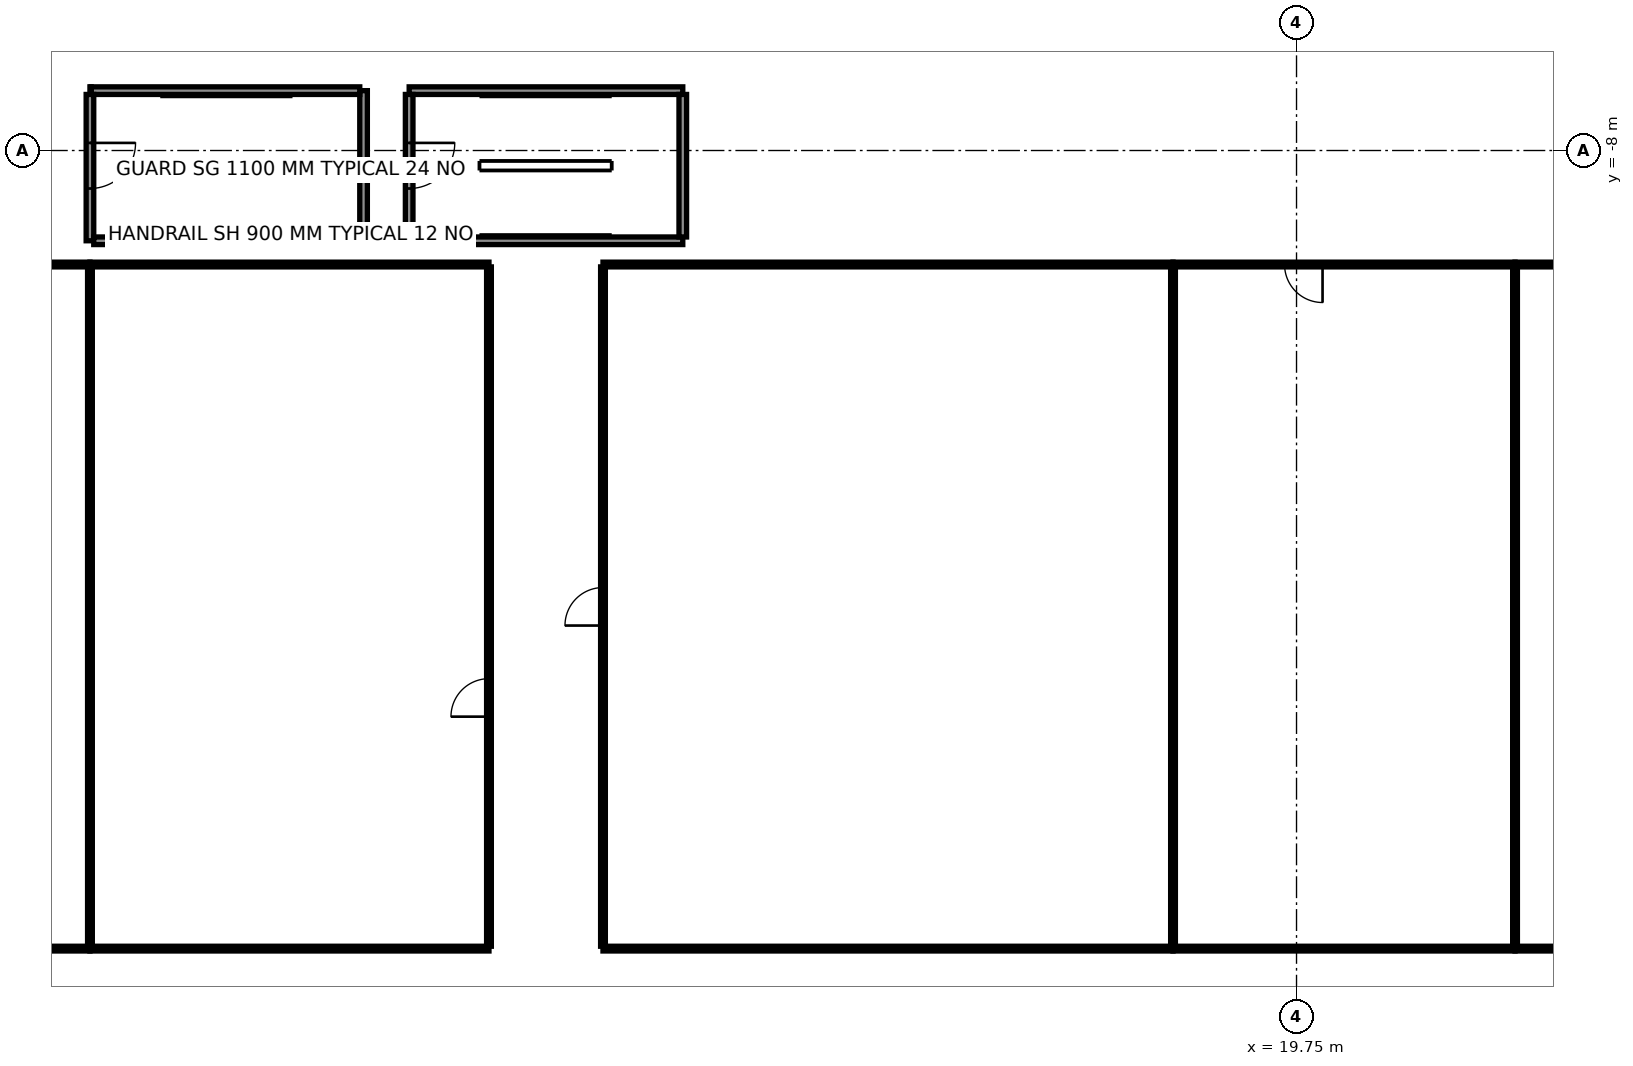
"""IFC4 building model, lengths in metres.
Left out: names, types, materials, properties, quantities, classifications, styles, units other than length and angle.
Written with IfcOpenShell. Run it as: python <this file> out.ifc"""

import sys

from ifc_helpers import new_model, si_unit, direction, frame, frame_2d, origin, origin_2d, place, context, subcontext, project, spatial, rectangle, hollow_rectangle, circle, extrude, element, fill, save


model = new_model("IFC4")
c1 = context("Model", 3, precision=1e-05, world=origin(), true_north=direction((0.0, 1.0)))
c2 = subcontext(c1, "Body", "Model", "MODEL_VIEW")
j1 = project(units=[si_unit("LENGTHUNIT", "METRE"), si_unit("PLANEANGLEUNIT", "RADIAN")], contexts=[c1])
p1 = place(None, origin())
s1 = spatial("IfcSite", under=j1, at=p1, CompositionType="ELEMENT")
p2 = place(p1, origin())
s2 = spatial("IfcBuilding", under=s1, at=p2, CompositionType="ELEMENT")
p3 = place(p2, frame((0.0, 0.0, 7.0)))
s3 = spatial("IfcBuildingStorey", under=s2, at=p3, CompositionType="ELEMENT", Elevation=7.0)
for number, where, z_axis, x_axis in (
    (1, (-4.2, -26.0, 0.0), (0.0, 0.0, 1.0), (1.0, 0.0, 0.0)),
    (2, (-4.2, -12.6, 0.0), (0.0, 0.0, 1.0), (1.0, 0.0, 0.0)),
    (3, (4.2, -26.0, 0.0), (0.0, 0.0, 1.0), (1.0, 0.0, 0.0)),
    (4, (4.2, -12.6, 0.0), (0.0, 0.0, 1.0), (1.0, 0.0, 0.0)),
    (5, (12.6, -26.0, 0.0), (0.0, 0.0, 1.0), (1.0, 0.0, 0.0)),
):
    element("IfcColumn", number, at=place(p3, frame(where, z_axis=z_axis, x_axis=x_axis)), inside=s3, PredefinedType="COLUMN", context=c2, shape_type="SweptSolid", body=[
        extrude(circle(Radius=0.6, at=origin_2d()), origin(), (0.0, 0.0, 1.0), 5.0),
    ])
for number, where, z_axis, x_axis in (
    (6, (-11.317, -11.797, 0.0), (0.0, 0.0, 1.0), (0.866, -0.5, 0.0)),
    (7, (8.96, -6.107, 0.0), (0.0, 0.0, 1.0), (-0.966, -0.259, 0.0)),
    (8, (14.594, -17.156, 0.0), (0.0, 0.0, 1.0), (-0.707, -0.707, 0.0)),
    (9, (25.643, -22.79, 0.0), (0.0, 0.0, 1.0), (-0.259, -0.966, 0.0)),
):
    element("IfcColumn", number, at=place(p3, frame(where, z_axis=z_axis, x_axis=x_axis)), inside=s3, PredefinedType="COLUMN", context=c2, shape_type="SweptSolid", body=[
        extrude(hollow_rectangle(XDim=1.5, YDim=1.5, WallThickness=0.07, at=origin_2d()), origin(), (0.0, 0.0, 1.0), 5.0),
    ])
p4 = place(p3, frame((19.3, -8.0, 0.0), z_axis=(0.0, 0.0, 1.0), x_axis=(1.0, 0.0, 0.0)))
e10 = element("IfcWall", 10, at=p4, inside=s3, PredefinedType="SHEAR", context=c2, shape_type="SweptSolid", body=[
    extrude(rectangle(XDim=24.9, YDim=0.9, at=frame_2d((12.45, 0.0))), origin(), (0.0, 0.0, 1.0), 5.0),
])
p5 = place(p4, frame((13.3, 0.0, 0.0)))
e11 = element("IfcOpeningElement", 11, at=p5, cuts=e10, PredefinedType="OPENING", context=c2, shape_type="SweptSolid", body=[
    extrude(rectangle(XDim=1.1, YDim=2.1, at=frame_2d((0.55, 1.05))), frame((0.0, 0.46, 0.0), z_axis=(0.0, -1.0, 0.0), x_axis=(1.0, 0.0, 0.0)), (0.0, 0.0, 1.0), 0.92),
])
p6 = place(p4, frame((1.775, 0.0, 0.0)))
e12 = element("IfcOpeningElement", 12, at=p6, cuts=e10, PredefinedType="OPENING", context=c2, shape_type="SweptSolid", body=[
    extrude(rectangle(XDim=0.9, YDim=2.1, at=frame_2d((0.45, 1.05))), frame((0.0, 0.46, 0.0), z_axis=(0.0, -1.0, 0.0), x_axis=(1.0, 0.0, 0.0)), (0.0, 0.0, 1.0), 0.92),
])
p7 = place(p4, frame((4.425, 0.0, 0.0)))
e13 = element("IfcOpeningElement", 13, at=p7, cuts=e10, PredefinedType="OPENING", context=c2, shape_type="SweptSolid", body=[
    extrude(rectangle(XDim=0.9, YDim=2.1, at=frame_2d((0.45, 1.05))), frame((0.0, 0.46, 0.0), z_axis=(0.0, -1.0, 0.0), x_axis=(1.0, 0.0, 0.0)), (0.0, 0.0, 1.0), 0.92),
])
p8 = place(p4, frame((6.675, 0.0, 0.0)))
e14 = element("IfcOpeningElement", 14, at=p8, cuts=e10, PredefinedType="OPENING", context=c2, shape_type="SweptSolid", body=[
    extrude(rectangle(XDim=1.0, YDim=2.1, at=frame_2d((0.5, 1.05))), frame((0.0, 0.46, 0.0), z_axis=(0.0, -1.0, 0.0), x_axis=(1.0, 0.0, 0.0)), (0.0, 0.0, 1.0), 0.92),
])
p9 = place(p3, frame((19.75, -8.0, 0.0), z_axis=(0.0, 0.0, 1.0), x_axis=(0.0, 1.0, 0.0)))
e15 = element("IfcWall", 15, at=p9, inside=s3, PredefinedType="SHEAR", context=c2, shape_type="SweptSolid", body=[
    extrude(rectangle(XDim=16.0, YDim=0.9, at=frame_2d((8.0, 0.0))), origin(), (0.0, 0.0, 1.0), 5.0),
])
p10 = place(p9, frame((7.1, 0.0, 0.0)))
e16 = element("IfcOpeningElement", 16, at=p10, cuts=e15, PredefinedType="OPENING", context=c2, shape_type="SweptSolid", body=[
    extrude(rectangle(XDim=1.8, YDim=2.1, at=frame_2d((0.9, 1.05))), frame((0.0, 0.46, 0.0), z_axis=(0.0, -1.0, 0.0), x_axis=(1.0, 0.0, 0.0)), (0.0, 0.0, 1.0), 0.92),
])
for number, where, z_axis, x_axis in (
    (17, (22.95, -4.4, 0.0), (0.0, 0.0, 1.0), (0.0, -1.0, 0.0)),
    (18, (25.4, -4.4, 0.0), (0.0, 0.0, 1.0), (0.0, -1.0, 0.0)),
):
    element("IfcWall", number, at=place(p3, frame(where, z_axis=z_axis, x_axis=x_axis)), inside=s3, PredefinedType="PARTITIONING", context=c2, shape_type="SweptSolid", body=[
        extrude(rectangle(XDim=3.15, YDim=0.2, at=frame_2d((1.575, 0.0))), origin(), (0.0, 0.0, 1.0), 5.0),
    ])
p11 = place(p3, frame((-4.8, -10.375, 0.0), z_axis=(0.0, 0.0, 1.0), x_axis=(0.0, 1.0, 0.0)))
e19 = element("IfcWall", 19, at=p11, inside=s3, PredefinedType="SOLIDWALL", context=c2, shape_type="SweptSolid", body=[
    extrude(rectangle(XDim=3.95, YDim=0.2, at=frame_2d((1.975, 0.0))), origin(), (0.0, 0.0, 1.0), 4.7),
])
p12 = place(p3, frame((-4.9, -6.425, 0.0), z_axis=(0.0, 0.0, 1.0), x_axis=(-1.0, 0.0, 0.0)))
e20 = element("IfcWall", 20, at=p12, inside=s3, PredefinedType="SOLIDWALL", context=c2, shape_type="SweptSolid", body=[
    extrude(rectangle(XDim=7.068, YDim=0.2, at=frame_2d((3.534, 0.0))), origin(), (0.0, 0.0, 1.0), 4.7),
])
p13 = place(p3, frame((-11.968, -6.425, 0.0), z_axis=(0.0, 0.0, 1.0), x_axis=(-1.0, 0.0, 0.0)))
e21 = element("IfcWall", 21, at=p13, inside=s3, PredefinedType="SOLIDWALL", context=c2, shape_type="SweptSolid", body=[
    extrude(rectangle(XDim=0.032, YDim=0.2, at=frame_2d((0.016, 0.0))), origin(), (0.0, 0.0, 1.0), 3.996),
])
p14 = place(p3, frame((-12.0, -6.525, 0.0), z_axis=(0.0, 0.0, 1.0), x_axis=(0.0, -1.0, 0.0)))
e22 = element("IfcWall", 22, at=p14, inside=s3, PredefinedType="SOLIDWALL", context=c2, shape_type="SweptSolid", body=[
    extrude(rectangle(XDim=3.85, YDim=0.2, at=frame_2d((1.925, 0.0))), origin(), (0.0, 0.0, 1.0), 4.7),
])
p15 = place(p14, frame((1.275, 0.0, 0.0)))
e23 = element("IfcOpeningElement", 23, at=p15, cuts=e22, PredefinedType="OPENING", context=c2, shape_type="SweptSolid", body=[
    extrude(rectangle(XDim=1.2, YDim=2.1, at=frame_2d((0.6, 1.05))), frame((0.0, 0.11, 0.0), z_axis=(0.0, -1.0, 0.0), x_axis=(1.0, 0.0, 0.0)), (0.0, 0.0, 1.0), 0.22),
])
p16 = place(p3, frame((-11.9, -10.375, 0.0), z_axis=(0.0, 0.0, 1.0), x_axis=(1.0, 0.0, 0.0)))
e24 = element("IfcWall", 24, at=p16, inside=s3, PredefinedType="SOLIDWALL", context=c2, shape_type="SweptSolid", body=[
    extrude(rectangle(XDim=7.0, YDim=0.2, at=frame_2d((3.5, 0.0))), origin(), (0.0, 0.0, 1.0), 4.7),
])
p17 = place(p3, frame((3.6, -6.425, 0.0), z_axis=(0.0, 0.0, 1.0), x_axis=(-1.0, 0.0, 0.0)))
e25 = element("IfcWall", 25, at=p17, inside=s3, PredefinedType="SOLIDWALL", context=c2, shape_type="SweptSolid", body=[
    extrude(rectangle(XDim=7.2, YDim=0.2, at=frame_2d((3.6, 0.0))), origin(), (0.0, 0.0, 1.0), 4.7),
])
p18 = place(p3, frame((-3.6, -6.525, 0.0), z_axis=(0.0, 0.0, 1.0), x_axis=(0.0, -1.0, 0.0)))
e26 = element("IfcWall", 26, at=p18, inside=s3, PredefinedType="SOLIDWALL", context=c2, shape_type="SweptSolid", body=[
    extrude(rectangle(XDim=3.85, YDim=0.2, at=frame_2d((1.925, 0.0))), origin(), (0.0, 0.0, 1.0), 4.7),
])
p19 = place(p18, frame((1.275, 0.0, 0.0)))
e27 = element("IfcOpeningElement", 27, at=p19, cuts=e26, PredefinedType="OPENING", context=c2, shape_type="SweptSolid", body=[
    extrude(rectangle(XDim=1.2, YDim=2.1, at=frame_2d((0.6, 1.05))), frame((0.0, 0.11, 0.0), z_axis=(0.0, -1.0, 0.0), x_axis=(1.0, 0.0, 0.0)), (0.0, 0.0, 1.0), 0.22),
])
p20 = place(p3, frame((-3.5, -10.375, 0.0), z_axis=(0.0, 0.0, 1.0), x_axis=(1.0, 0.0, 0.0)))
e28 = element("IfcWall", 28, at=p20, inside=s3, PredefinedType="SOLIDWALL", context=c2, shape_type="SweptSolid", body=[
    extrude(rectangle(XDim=7.1, YDim=0.2, at=frame_2d((3.55, 0.0))), origin(), (0.0, 0.0, 1.0), 4.7),
])
p21 = place(p3, frame((3.6, -10.275, 0.0), z_axis=(0.0, 0.0, 1.0), x_axis=(0.0, 1.0, 0.0)))
e29 = element("IfcWall", 29, at=p21, inside=s3, PredefinedType="SOLIDWALL", context=c2, shape_type="SweptSolid", body=[
    extrude(rectangle(XDim=3.75, YDim=0.2, at=frame_2d((1.875, 0.0))), origin(), (0.0, 0.0, 1.0), 4.7),
])
p22 = place(p3, frame((-27.0, -11.0, 0.0), z_axis=(0.0, 0.0, 1.0), x_axis=(1.0, 0.0, 0.0)))
e30 = element("IfcWall", 30, at=p22, inside=s3, PredefinedType="PARTITIONING", context=c2, shape_type="SweptSolid", body=[
    extrude(rectangle(XDim=15.0, YDim=0.125, at=frame_2d((7.5, 0.0))), origin(), (0.0, 0.0, 1.0), 3.996),
])
p23 = place(p22, frame((5.035, 0.0, 0.0)))
e31 = element("IfcOpeningElement", 31, at=p23, cuts=e30, PredefinedType="OPENING", context=c2, shape_type="SweptSolid", body=[
    extrude(rectangle(XDim=1.0, YDim=2.1, at=frame_2d((0.5, 1.05))), frame((0.0, 0.073, 0.0), z_axis=(0.0, -1.0, 0.0), x_axis=(1.0, 0.0, 0.0)), (0.0, 0.0, 1.0), 0.145),
])
p24 = place(p3, frame((-12.0, -11.0, 0.0), z_axis=(0.0, 0.0, 1.0), x_axis=(1.0, 0.0, 0.0)))
e32 = element("IfcWall", 32, at=p24, inside=s3, PredefinedType="PARTITIONING", context=c2, shape_type="SweptSolid", body=[
    extrude(rectangle(XDim=10.5, YDim=0.125, at=frame_2d((5.25, 0.0))), origin(), (0.0, 0.0, 1.0), 4.7),
])
p25 = place(p3, frame((1.5, -11.0, 0.0), z_axis=(0.0, 0.0, 1.0), x_axis=(1.0, 0.0, 0.0)))
e33 = element("IfcWall", 33, at=p25, inside=s3, PredefinedType="PARTITIONING", context=c2, shape_type="SweptSolid", body=[
    extrude(rectangle(XDim=15.0, YDim=0.125, at=frame_2d((7.5, 0.0))), origin(), (0.0, 0.0, 1.0), 3.762),
])
p26 = place(p3, frame((16.5, -11.0, 0.0), z_axis=(0.0, 0.0, 1.0), x_axis=(1.0, 0.0, 0.0)))
e34 = element("IfcWall", 34, at=p26, inside=s3, PredefinedType="PARTITIONING", context=c2, shape_type="SweptSolid", body=[
    extrude(rectangle(XDim=9.0, YDim=0.125, at=frame_2d((4.5, 0.0))), origin(), (0.0, 0.0, 1.0), 3.996),
])
p27 = place(p26, frame((2.935, 0.0, 0.0)))
e35 = element("IfcOpeningElement", 35, at=p27, cuts=e34, PredefinedType="OPENING", context=c2, shape_type="SweptSolid", body=[
    extrude(rectangle(XDim=1.0, YDim=2.1, at=frame_2d((0.5, 1.05))), frame((0.0, 0.073, 0.0), z_axis=(0.0, -1.0, 0.0), x_axis=(1.0, 0.0, 0.0)), (0.0, 0.0, 1.0), 0.145),
])
p28 = place(p3, frame((25.5, -11.0, 0.0), z_axis=(0.0, 0.0, 1.0), x_axis=(1.0, 0.0, 0.0)))
e36 = element("IfcWall", 36, at=p28, inside=s3, PredefinedType="PARTITIONING", context=c2, shape_type="SweptSolid", body=[
    extrude(rectangle(XDim=12.0, YDim=0.125, at=frame_2d((6.0, 0.0))), origin(), (0.0, 0.0, 1.0), 3.918),
])
p29 = place(p28, frame((7.015, 0.0, 0.0)))
e37 = element("IfcOpeningElement", 37, at=p29, cuts=e36, PredefinedType="OPENING", context=c2, shape_type="SweptSolid", body=[
    extrude(rectangle(XDim=1.0, YDim=2.1, at=frame_2d((0.5, 1.05))), frame((0.0, 0.073, 0.0), z_axis=(0.0, -1.0, 0.0), x_axis=(1.0, 0.0, 0.0)), (0.0, 0.0, 1.0), 0.145),
])
p30 = place(p3, frame((-12.0, -29.0, 0.0), z_axis=(0.0, 0.0, 1.0), x_axis=(-1.0, 0.0, 0.0)))
e38 = element("IfcWall", 38, at=p30, inside=s3, PredefinedType="PARTITIONING", context=c2, shape_type="SweptSolid", body=[
    extrude(rectangle(XDim=15.0, YDim=0.125, at=frame_2d((7.5, 0.0))), origin(), (0.0, 0.0, 1.0), 3.762),
])
p31 = place(p3, frame((-1.5, -29.0, 0.0), z_axis=(0.0, 0.0, 1.0), x_axis=(-1.0, 0.0, 0.0)))
e39 = element("IfcWall", 39, at=p31, inside=s3, PredefinedType="PARTITIONING", context=c2, shape_type="SweptSolid", body=[
    extrude(rectangle(XDim=10.5, YDim=0.125, at=frame_2d((5.25, 0.0))), origin(), (0.0, 0.0, 1.0), 3.762),
])
p32 = place(p3, frame((16.5, -29.0, 0.0), z_axis=(0.0, 0.0, 1.0), x_axis=(-1.0, 0.0, 0.0)))
e40 = element("IfcWall", 40, at=p32, inside=s3, PredefinedType="PARTITIONING", context=c2, shape_type="SweptSolid", body=[
    extrude(rectangle(XDim=15.0, YDim=0.125, at=frame_2d((7.5, 0.0))), origin(), (0.0, 0.0, 1.0), 3.762),
])
p33 = place(p3, frame((25.5, -29.0, 0.0), z_axis=(0.0, 0.0, 1.0), x_axis=(-1.0, 0.0, 0.0)))
e41 = element("IfcWall", 41, at=p33, inside=s3, PredefinedType="PARTITIONING", context=c2, shape_type="SweptSolid", body=[
    extrude(rectangle(XDim=9.0, YDim=0.125, at=frame_2d((4.5, 0.0))), origin(), (0.0, 0.0, 1.0), 3.762),
])
p34 = place(p3, frame((37.5, -29.0, 0.0), z_axis=(0.0, 0.0, 1.0), x_axis=(-1.0, 0.0, 0.0)))
e42 = element("IfcWall", 42, at=p34, inside=s3, PredefinedType="PARTITIONING", context=c2, shape_type="SweptSolid", body=[
    extrude(rectangle(XDim=12.0, YDim=0.125, at=frame_2d((6.0, 0.0))), origin(), (0.0, 0.0, 1.0), 3.762),
])
p35 = place(p3, frame((-1.5, -11.062, 0.0), z_axis=(0.0, 0.0, 1.0), x_axis=(0.0, -1.0, 0.0)))
e43 = element("IfcWall", 43, at=p35, inside=s3, PredefinedType="PARTITIONING", context=c2, shape_type="SweptSolid", body=[
    extrude(rectangle(XDim=17.875, YDim=0.125, at=frame_2d((8.938, 0.0))), origin(), (0.0, 0.0, 1.0), 3.48),
])
p36 = place(p35, frame((10.834, 0.0, 0.0)))
e44 = element("IfcOpeningElement", 44, at=p36, cuts=e43, PredefinedType="OPENING", context=c2, shape_type="SweptSolid", body=[
    extrude(rectangle(XDim=1.0, YDim=2.1, at=frame_2d((0.5, 1.05))), frame((0.0, 0.073, 0.0), z_axis=(0.0, -1.0, 0.0), x_axis=(1.0, 0.0, 0.0)), (0.0, 0.0, 1.0), 0.145),
])
p37 = place(p3, frame((1.5, -28.938, 0.0), z_axis=(0.0, 0.0, 1.0), x_axis=(0.0, 1.0, 0.0)))
e45 = element("IfcWall", 45, at=p37, inside=s3, PredefinedType="PARTITIONING", context=c2, shape_type="SweptSolid", body=[
    extrude(rectangle(XDim=17.875, YDim=0.125, at=frame_2d((8.938, 0.0))), origin(), (0.0, 0.0, 1.0), 3.48),
])
p38 = place(p37, frame((8.438, 0.0, 0.0)))
e46 = element("IfcOpeningElement", 46, at=p38, cuts=e45, PredefinedType="OPENING", context=c2, shape_type="SweptSolid", body=[
    extrude(rectangle(XDim=1.0, YDim=2.1, at=frame_2d((0.5, 1.05))), frame((0.0, 0.073, 0.0), z_axis=(0.0, -1.0, 0.0), x_axis=(1.0, 0.0, 0.0)), (0.0, 0.0, 1.0), 0.145),
])
p39 = place(p3, frame((-12.0, -28.938, 0.0), z_axis=(0.0, 0.0, 1.0), x_axis=(0.0, 1.0, 0.0)))
e47 = element("IfcWall", 47, at=p39, inside=s3, PredefinedType="PARTITIONING", context=c2, shape_type="SweptSolid", body=[
    extrude(rectangle(XDim=17.875, YDim=0.125, at=frame_2d((8.938, 0.0))), origin(), (0.0, 0.0, 1.0), 3.48),
])
for number, where, z_axis, x_axis in (
    (48, (16.5, -28.938, 0.0), (0.0, 0.0, 1.0), (0.0, 1.0, 0.0)),
    (49, (25.5, -28.938, 0.0), (0.0, 0.0, 1.0), (0.0, 1.0, 0.0)),
):
    element("IfcWall", number, at=place(p3, frame(where, z_axis=z_axis, x_axis=x_axis)), inside=s3, PredefinedType="PARTITIONING", context=c2, shape_type="SweptSolid", body=[
        extrude(rectangle(XDim=17.875, YDim=0.125, at=frame_2d((8.938, 0.0))), origin(), (0.0, 0.0, 1.0), 3.996),
    ])
p40 = place(p6, origin())
e50 = element("IfcDoor", 50, at=p40, inside=s3, OperationType="SINGLE_SWING_RIGHT", PredefinedType="DOOR", context=c2, shape_type="SweptSolid", body=[
    extrude(rectangle(XDim=0.9, YDim=2.1, at=frame_2d((0.45, 1.05))), frame((0.0, 0.45, 0.0), z_axis=(0.0, -1.0, 0.0), x_axis=(1.0, 0.0, 0.0)), (0.0, 0.0, 1.0), 0.05),
])
fill(e12, e50)
p41 = place(p7, origin())
e51 = element("IfcDoor", 51, at=p41, inside=s3, OperationType="SINGLE_SWING_RIGHT", PredefinedType="DOOR", context=c2, shape_type="SweptSolid", body=[
    extrude(rectangle(XDim=0.9, YDim=2.1, at=frame_2d((0.45, 1.05))), frame((0.0, 0.45, 0.0), z_axis=(0.0, -1.0, 0.0), x_axis=(1.0, 0.0, 0.0)), (0.0, 0.0, 1.0), 0.05),
])
fill(e13, e51)
p42 = place(p8, origin())
e52 = element("IfcDoor", 52, at=p42, inside=s3, OperationType="SINGLE_SWING_LEFT", PredefinedType="DOOR", context=c2, shape_type="SweptSolid", body=[
    extrude(rectangle(XDim=1.0, YDim=2.1, at=frame_2d((0.5, 1.05))), frame((0.0, 0.45, 0.0), z_axis=(0.0, -1.0, 0.0), x_axis=(1.0, 0.0, 0.0)), (0.0, 0.0, 1.0), 0.05),
])
fill(e14, e52)
p43 = place(p36, origin())
e53 = element("IfcDoor", 53, at=p43, inside=s3, OperationType="SINGLE_SWING_RIGHT", PredefinedType="DOOR", context=c2, shape_type="SweptSolid", body=[
    extrude(rectangle(XDim=1.0, YDim=2.1, at=frame_2d((0.5, 1.05))), frame((0.0, 0.025, 0.0), z_axis=(0.0, -1.0, 0.0), x_axis=(1.0, 0.0, 0.0)), (0.0, 0.0, 1.0), 0.05),
])
fill(e44, e53)
p44 = place(p38, origin())
e54 = element("IfcDoor", 54, at=p44, inside=s3, OperationType="SINGLE_SWING_LEFT", PredefinedType="DOOR", context=c2, shape_type="SweptSolid", body=[
    extrude(rectangle(XDim=1.0, YDim=2.1, at=frame_2d((0.5, 1.05))), frame((0.0, 0.025, 0.0), z_axis=(0.0, -1.0, 0.0), x_axis=(1.0, 0.0, 0.0)), (0.0, 0.0, 1.0), 0.05),
])
fill(e46, e54)
p45 = place(p27, origin())
e55 = element("IfcDoor", 55, at=p45, inside=s3, OperationType="SINGLE_SWING_RIGHT", PredefinedType="DOOR", context=c2, shape_type="SweptSolid", body=[
    extrude(rectangle(XDim=1.0, YDim=2.1, at=frame_2d((0.5, 1.05))), frame((0.0, 0.025, 0.0), z_axis=(0.0, -1.0, 0.0), x_axis=(1.0, 0.0, 0.0)), (0.0, 0.0, 1.0), 0.05),
])
fill(e35, e55)
p46 = place(p15, frame((1.2, 0.0, 0.0), z_axis=(0.0, 0.0, 1.0), x_axis=(-1.0, 0.0, 0.0)))
e56 = element("IfcDoor", 56, at=p46, inside=s3, OperationType="SINGLE_SWING_LEFT", PredefinedType="DOOR", context=c2, shape_type="SweptSolid", body=[
    extrude(rectangle(XDim=1.2, YDim=2.1, at=frame_2d((0.6, 1.05))), frame((0.0, 0.025, 0.0), z_axis=(0.0, -1.0, 0.0), x_axis=(1.0, 0.0, 0.0)), (0.0, 0.0, 1.0), 0.05),
])
fill(e23, e56)
p47 = place(p19, frame((1.2, 0.0, 0.0), z_axis=(0.0, 0.0, 1.0), x_axis=(-1.0, 0.0, 0.0)))
e57 = element("IfcDoor", 57, at=p47, inside=s3, OperationType="SINGLE_SWING_LEFT", PredefinedType="DOOR", context=c2, shape_type="SweptSolid", body=[
    extrude(rectangle(XDim=1.2, YDim=2.1, at=frame_2d((0.6, 1.05))), frame((0.0, 0.025, 0.0), z_axis=(0.0, -1.0, 0.0), x_axis=(1.0, 0.0, 0.0)), (0.0, 0.0, 1.0), 0.05),
])
fill(e27, e57)
save(model, sys.argv[1])
